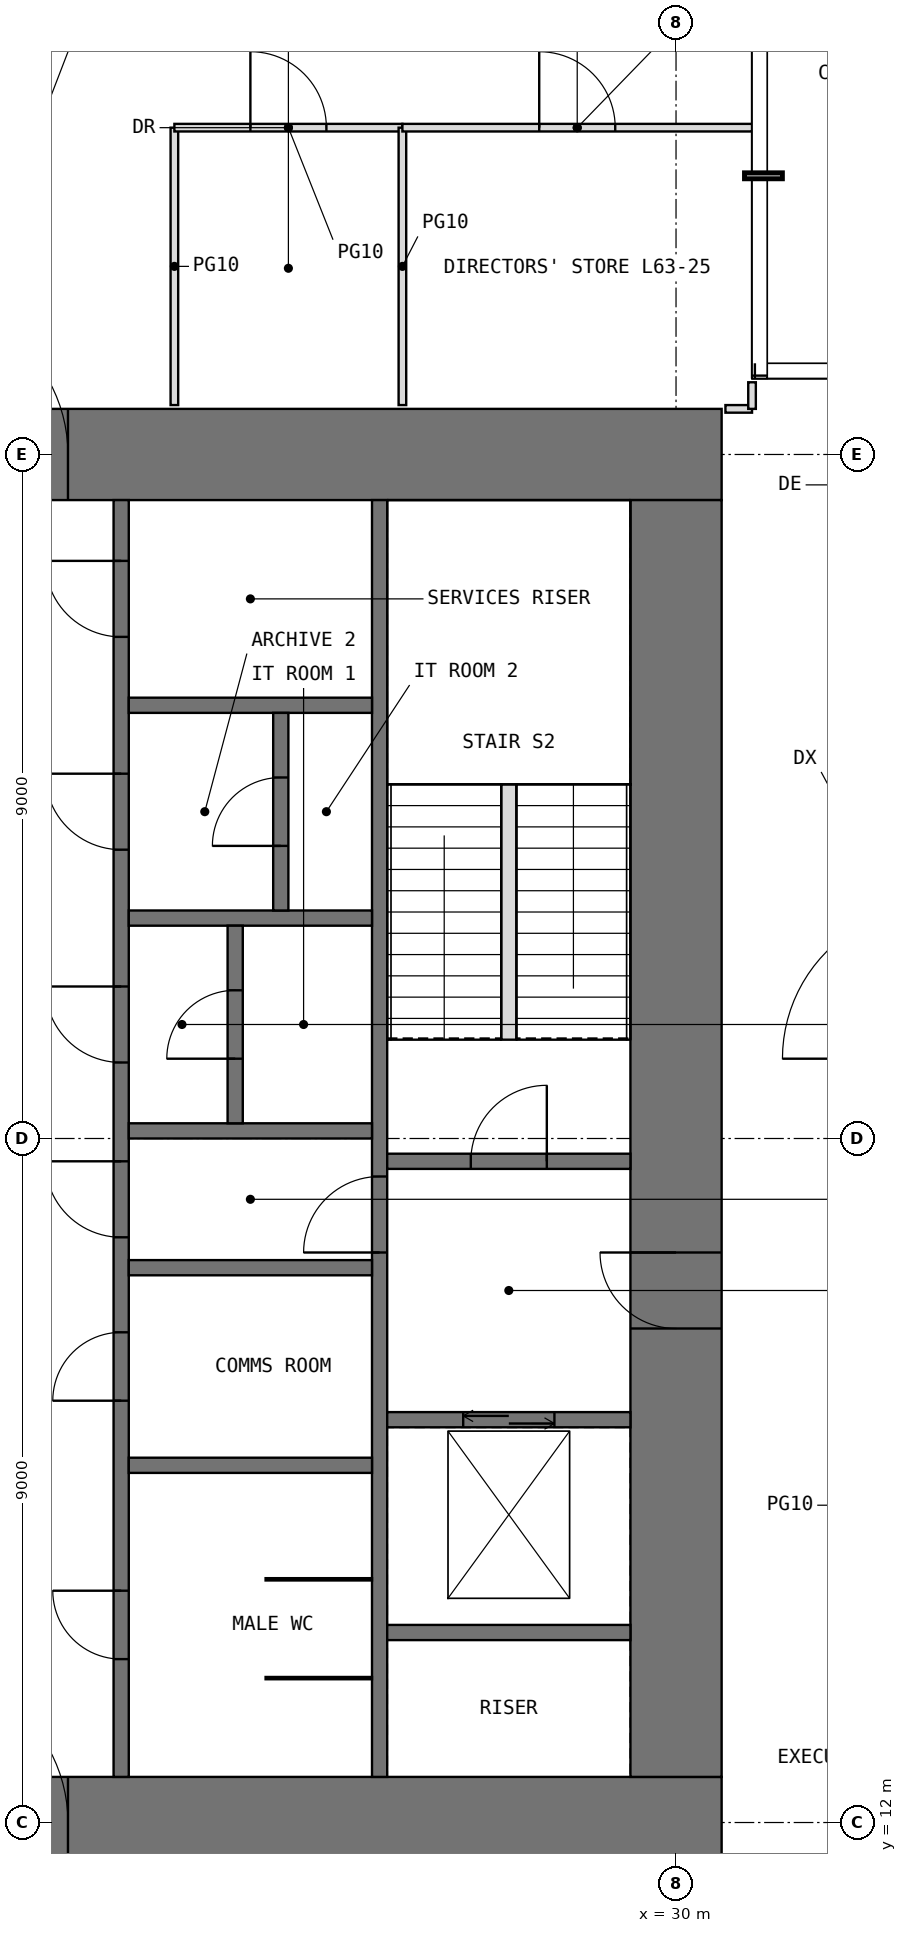
"""IFC4 building model, lengths in metres.
Left out: names, types, materials, properties, quantities, classifications, styles, units other than length and angle.
Written with IfcOpenShell. Run it as: python <this file> out.ifc"""

import sys

from ifc_helpers import new_model, si_unit, direction, frame, frame_2d, origin, place, context, subcontext, project, spatial, rectangle, extrude, element, fill, save


model = new_model("IFC4")
c1 = context("Model", 3, precision=1e-05, world=origin(), true_north=direction((0.0, 1.0)))
c2 = subcontext(c1, "Body", "Model", "MODEL_VIEW")
j1 = project(units=[si_unit("LENGTHUNIT", "METRE"), si_unit("PLANEANGLEUNIT", "RADIAN")], contexts=[c1])
p1 = place(None, origin())
s1 = spatial("IfcSite", under=j1, at=p1, CompositionType="ELEMENT")
p2 = place(p1, origin())
s2 = spatial("IfcBuilding", under=s1, at=p2, CompositionType="ELEMENT")
p3 = place(p2, frame((0.0, 0.0, 265.0)))
s3 = spatial("IfcBuildingStorey", under=s2, at=p3, CompositionType="ELEMENT", Elevation=265.0)
p4 = place(p3, frame((11.4, 12.0, -0.05), z_axis=(0.0, 0.0, 1.0), x_axis=(1.0, 0.0, 0.0)))
e1 = element("IfcWall", 1, at=p4, inside=s3, PredefinedType="SHEAR", context=c2, shape_type="SweptSolid", body=[
    extrude(rectangle(XDim=19.2, YDim=1.2, at=frame_2d((9.6, 0.0))), origin(), (0.0, 0.0, 1.0), 4.2),
])
p5 = place(p4, frame((8.6, 0.0, 0.05)))
e2 = element("IfcOpeningElement", 2, at=p5, cuts=e1, PredefinedType="OPENING", context=c2, shape_type="SweptSolid", body=[
    extrude(rectangle(XDim=2.0, YDim=2.2, at=frame_2d((1.0, 1.1))), frame((0.0, 0.61, 0.0), z_axis=(0.0, -1.0, 0.0), x_axis=(1.0, 0.0, 0.0)), (0.0, 0.0, 1.0), 1.22),
])
p6 = place(p3, frame((11.4, 30.0, -0.05), z_axis=(0.0, 0.0, 1.0), x_axis=(1.0, 0.0, 0.0)))
e3 = element("IfcWall", 3, at=p6, inside=s3, PredefinedType="SHEAR", context=c2, shape_type="SweptSolid", body=[
    extrude(rectangle(XDim=19.2, YDim=1.2, at=frame_2d((9.6, 0.0))), origin(), (0.0, 0.0, 1.0), 4.2),
])
p7 = place(p6, frame((8.6, 0.0, 0.05)))
e4 = element("IfcOpeningElement", 4, at=p7, cuts=e3, PredefinedType="OPENING", context=c2, shape_type="SweptSolid", body=[
    extrude(rectangle(XDim=2.0, YDim=2.2, at=frame_2d((1.0, 1.1))), frame((0.0, 0.61, 0.0), z_axis=(0.0, -1.0, 0.0), x_axis=(1.0, 0.0, 0.0)), (0.0, 0.0, 1.0), 1.22),
])
p8 = place(p3, frame((30.0, 12.6, -0.05), z_axis=(0.0, 0.0, 1.0), x_axis=(0.0, 1.0, 0.0)))
e5 = element("IfcWall", 5, at=p8, inside=s3, PredefinedType="SHEAR", context=c2, shape_type="SweptSolid", body=[
    extrude(rectangle(XDim=16.8, YDim=1.2, at=frame_2d((8.4, 0.0))), origin(), (0.0, 0.0, 1.0), 4.2),
])
p9 = place(p8, frame((5.9, 0.0, 0.05)))
e6 = element("IfcOpeningElement", 6, at=p9, cuts=e5, PredefinedType="OPENING", context=c2, shape_type="SweptSolid", body=[
    extrude(rectangle(XDim=1.0, YDim=2.2, at=frame_2d((0.5, 1.1))), frame((0.0, 0.61, 0.0), z_axis=(0.0, -1.0, 0.0), x_axis=(1.0, 0.0, 0.0)), (0.0, 0.0, 1.0), 1.22),
])
p10 = place(p3, frame((22.7, 12.6, -0.05), z_axis=(0.0, 0.0, 1.0), x_axis=(0.0, 1.0, 0.0)))
e7 = element("IfcWall", 7, at=p10, inside=s3, PredefinedType="SHEAR", context=c2, shape_type="SweptSolid", body=[
    extrude(rectangle(XDim=16.8, YDim=0.2, at=frame_2d((8.4, 0.0))), origin(), (0.0, 0.0, 1.0), 4.2),
])
p11 = place(p10, frame((7.1, 0.0, 0.05)))
e8 = element("IfcOpeningElement", 8, at=p11, cuts=e7, PredefinedType="OPENING", context=c2, shape_type="SweptSolid", body=[
    extrude(rectangle(XDim=1.0, YDim=2.2, at=frame_2d((0.5, 1.1))), frame((0.0, 0.11, 0.0), z_axis=(0.0, -1.0, 0.0), x_axis=(1.0, 0.0, 0.0)), (0.0, 0.0, 1.0), 0.22),
])
p12 = place(p10, frame((1.55, 0.0, 0.05)))
e9 = element("IfcOpeningElement", 9, at=p12, cuts=e7, PredefinedType="OPENING", context=c2, shape_type="SweptSolid", body=[
    extrude(rectangle(XDim=0.9, YDim=2.2, at=frame_2d((0.45, 1.1))), frame((0.0, 0.11, 0.0), z_axis=(0.0, -1.0, 0.0), x_axis=(1.0, 0.0, 0.0)), (0.0, 0.0, 1.0), 0.22),
])
p13 = place(p10, frame((4.95, 0.0, 0.05)))
e10 = element("IfcOpeningElement", 10, at=p13, cuts=e7, PredefinedType="OPENING", context=c2, shape_type="SweptSolid", body=[
    extrude(rectangle(XDim=0.9, YDim=2.2, at=frame_2d((0.45, 1.1))), frame((0.0, 0.11, 0.0), z_axis=(0.0, -1.0, 0.0), x_axis=(1.0, 0.0, 0.0)), (0.0, 0.0, 1.0), 0.22),
])
p14 = place(p10, frame((9.4, 0.0, 0.05)))
e11 = element("IfcOpeningElement", 11, at=p14, cuts=e7, PredefinedType="OPENING", context=c2, shape_type="SweptSolid", body=[
    extrude(rectangle(XDim=1.0, YDim=2.2, at=frame_2d((0.5, 1.1))), frame((0.0, 0.11, 0.0), z_axis=(0.0, -1.0, 0.0), x_axis=(1.0, 0.0, 0.0)), (0.0, 0.0, 1.0), 0.22),
])
p15 = place(p10, frame((12.2, 0.0, 0.05)))
e12 = element("IfcOpeningElement", 12, at=p15, cuts=e7, PredefinedType="OPENING", context=c2, shape_type="SweptSolid", body=[
    extrude(rectangle(XDim=1.0, YDim=2.2, at=frame_2d((0.5, 1.1))), frame((0.0, 0.11, 0.0), z_axis=(0.0, -1.0, 0.0), x_axis=(1.0, 0.0, 0.0)), (0.0, 0.0, 1.0), 0.22),
])
p16 = place(p10, frame((15.0, 0.0, 0.05)))
e13 = element("IfcOpeningElement", 13, at=p16, cuts=e7, PredefinedType="OPENING", context=c2, shape_type="SweptSolid", body=[
    extrude(rectangle(XDim=1.0, YDim=2.2, at=frame_2d((0.5, 1.1))), frame((0.0, 0.11, 0.0), z_axis=(0.0, -1.0, 0.0), x_axis=(1.0, 0.0, 0.0)), (0.0, 0.0, 1.0), 0.22),
])
p17 = place(p3, frame((26.1, 12.6, -0.05), z_axis=(0.0, 0.0, 1.0), x_axis=(0.0, 1.0, 0.0)))
e14 = element("IfcWall", 14, at=p17, inside=s3, PredefinedType="SHEAR", context=c2, shape_type="SweptSolid", body=[
    extrude(rectangle(XDim=16.8, YDim=0.2, at=frame_2d((8.4, 0.0))), origin(), (0.0, 0.0, 1.0), 4.2),
])
p18 = place(p17, frame((6.9, 0.0, 0.05)))
e15 = element("IfcOpeningElement", 15, at=p18, cuts=e14, PredefinedType="OPENING", context=c2, shape_type="SweptSolid", body=[
    extrude(rectangle(XDim=1.0, YDim=2.2, at=frame_2d((0.5, 1.1))), frame((0.0, 0.11, 0.0), z_axis=(0.0, -1.0, 0.0), x_axis=(1.0, 0.0, 0.0)), (0.0, 0.0, 1.0), 0.22),
])
for number, where, z_axis, x_axis in (
    (16, (22.8, 16.7, -0.05), (0.0, 0.0, 1.0), (1.0, 0.0, 0.0)),
    (17, (22.8, 19.3, -0.05), (0.0, 0.0, 1.0), (1.0, 0.0, 0.0)),
    (18, (22.8, 21.1, -0.05), (0.0, 0.0, 1.0), (1.0, 0.0, 0.0)),
    (19, (22.8, 23.9, -0.05), (0.0, 0.0, 1.0), (1.0, 0.0, 0.0)),
    (20, (22.8, 26.7, -0.05), (0.0, 0.0, 1.0), (1.0, 0.0, 0.0)),
    (21, (26.2, 14.5, -0.05), (0.0, 0.0, 1.0), (1.0, 0.0, 0.0)),
):
    element("IfcWall", number, at=place(p3, frame(where, z_axis=z_axis, x_axis=x_axis)), inside=s3, PredefinedType="SHEAR", context=c2, shape_type="SweptSolid", body=[
        extrude(rectangle(XDim=3.2, YDim=0.2, at=frame_2d((1.6, 0.0))), origin(), (0.0, 0.0, 1.0), 4.2),
    ])
p19 = place(p3, frame((26.2, 17.3, -0.05), z_axis=(0.0, 0.0, 1.0), x_axis=(1.0, 0.0, 0.0)))
e22 = element("IfcWall", 22, at=p19, inside=s3, PredefinedType="SHEAR", context=c2, shape_type="SweptSolid", body=[
    extrude(rectangle(XDim=3.2, YDim=0.2, at=frame_2d((1.6, 0.0))), origin(), (0.0, 0.0, 1.0), 4.2),
])
p20 = place(p19, frame((1.0, 0.0, 0.05)))
e23 = element("IfcOpeningElement", 23, at=p20, cuts=e22, PredefinedType="OPENING", context=c2, shape_type="SweptSolid", body=[
    extrude(rectangle(XDim=1.2, YDim=2.2, at=frame_2d((0.6, 1.1))), frame((0.0, 0.11, 0.0), z_axis=(0.0, -1.0, 0.0), x_axis=(1.0, 0.0, 0.0)), (0.0, 0.0, 1.0), 0.22),
])
p21 = place(p3, frame((26.2, 20.7, -0.05), z_axis=(0.0, 0.0, 1.0), x_axis=(1.0, 0.0, 0.0)))
e24 = element("IfcWall", 24, at=p21, inside=s3, PredefinedType="SHEAR", context=c2, shape_type="SweptSolid", body=[
    extrude(rectangle(XDim=3.2, YDim=0.2, at=frame_2d((1.6, 0.0))), origin(), (0.0, 0.0, 1.0), 4.2),
])
p22 = place(p21, frame((1.1, 0.0, 0.05)))
e25 = element("IfcOpeningElement", 25, at=p22, cuts=e24, PredefinedType="OPENING", context=c2, shape_type="SweptSolid", body=[
    extrude(rectangle(XDim=1.0, YDim=2.2, at=frame_2d((0.5, 1.1))), frame((0.0, 0.11, 0.0), z_axis=(0.0, -1.0, 0.0), x_axis=(1.0, 0.0, 0.0)), (0.0, 0.0, 1.0), 0.22),
])
for number, where, z_axis, x_axis in (
    (26, (24.6, 13.9, 0.0), (0.0, 0.0, 1.0), (1.0, 0.0, 0.0)),
    (27, (24.6, 15.2, 0.0), (0.0, 0.0, 1.0), (1.0, 0.0, 0.0)),
):
    element("IfcWall", number, at=place(p3, frame(where, z_axis=z_axis, x_axis=x_axis)), inside=s3, PredefinedType="PARTITIONING", context=c2, shape_type="SweptSolid", body=[
        extrude(rectangle(XDim=1.4, YDim=0.03, at=frame_2d((0.7, 0.0))), origin(), (0.0, 0.0, 1.0), 3.95),
    ])
p23 = place(p3, frame((24.2, 21.2, -0.05), z_axis=(0.0, 0.0, 1.0), x_axis=(0.0, 1.0, 0.0)))
e28 = element("IfcWall", 28, at=p23, inside=s3, PredefinedType="SHEAR", context=c2, shape_type="SweptSolid", body=[
    extrude(rectangle(XDim=2.6, YDim=0.2, at=frame_2d((1.3, 0.0))), origin(), (0.0, 0.0, 1.0), 4.2),
])
p24 = place(p23, frame((0.85, 0.0, 0.05)))
e29 = element("IfcOpeningElement", 29, at=p24, cuts=e28, PredefinedType="OPENING", context=c2, shape_type="SweptSolid", body=[
    extrude(rectangle(XDim=0.9, YDim=2.2, at=frame_2d((0.45, 1.1))), frame((0.0, 0.11, 0.0), z_axis=(0.0, -1.0, 0.0), x_axis=(1.0, 0.0, 0.0)), (0.0, 0.0, 1.0), 0.22),
])
p25 = place(p3, frame((24.8, 24.0, -0.05), z_axis=(0.0, 0.0, 1.0), x_axis=(0.0, 1.0, 0.0)))
e30 = element("IfcWall", 30, at=p25, inside=s3, PredefinedType="SHEAR", context=c2, shape_type="SweptSolid", body=[
    extrude(rectangle(XDim=2.6, YDim=0.2, at=frame_2d((1.3, 0.0))), origin(), (0.0, 0.0, 1.0), 4.2),
])
p26 = place(p25, frame((0.85, 0.0, 0.05)))
e31 = element("IfcOpeningElement", 31, at=p26, cuts=e30, PredefinedType="OPENING", context=c2, shape_type="SweptSolid", body=[
    extrude(rectangle(XDim=0.9, YDim=2.2, at=frame_2d((0.45, 1.1))), frame((0.0, 0.11, 0.0), z_axis=(0.0, -1.0, 0.0), x_axis=(1.0, 0.0, 0.0)), (0.0, 0.0, 1.0), 0.22),
])
p27 = place(p3, frame((23.4, 30.65, 0.0), z_axis=(0.0, 0.0, 1.0), x_axis=(0.0, 1.0, 0.0)))
e32 = element("IfcWall", 32, at=p27, inside=s3, PredefinedType="PARTITIONING", context=c2, shape_type="SweptSolid", body=[
    extrude(rectangle(XDim=3.65, YDim=0.1, at=frame_2d((1.825, 0.0))), origin(), (0.0, 0.0, 1.0), 3.95),
])
p28 = place(p3, frame((23.4, 34.3, 0.0), z_axis=(0.0, 0.0, 1.0), x_axis=(1.0, 0.0, 0.0)))
e33 = element("IfcWall", 33, at=p28, inside=s3, PredefinedType="PARTITIONING", context=c2, shape_type="SweptSolid", body=[
    extrude(rectangle(XDim=3.0, YDim=0.1, at=frame_2d((1.5, 0.0))), origin(), (0.0, 0.0, 1.0), 3.95),
])
p29 = place(p28, frame((1.0, 0.0, 0.0)))
e34 = element("IfcOpeningElement", 34, at=p29, cuts=e33, PredefinedType="OPENING", context=c2, shape_type="SweptSolid", body=[
    extrude(rectangle(XDim=1.0, YDim=2.2, at=frame_2d((0.5, 1.1))), frame((0.0, 0.06, 0.0), z_axis=(0.0, -1.0, 0.0), x_axis=(1.0, 0.0, 0.0)), (0.0, 0.0, 1.0), 0.12),
])
p30 = place(p3, frame((26.4, 30.65, 0.0), z_axis=(0.0, 0.0, 1.0), x_axis=(0.0, 1.0, 0.0)))
e35 = element("IfcWall", 35, at=p30, inside=s3, PredefinedType="PARTITIONING", context=c2, shape_type="SweptSolid", body=[
    extrude(rectangle(XDim=3.65, YDim=0.1, at=frame_2d((1.825, 0.0))), origin(), (0.0, 0.0, 1.0), 3.95),
])
p31 = place(p3, frame((26.4, 34.3, 0.0), z_axis=(0.0, 0.0, 1.0), x_axis=(1.0, 0.0, 0.0)))
e36 = element("IfcWall", 36, at=p31, inside=s3, PredefinedType="PARTITIONING", context=c2, shape_type="SweptSolid", body=[
    extrude(rectangle(XDim=4.6, YDim=0.1, at=frame_2d((2.3, 0.0))), origin(), (0.0, 0.0, 1.0), 3.95),
])
p32 = place(p31, frame((1.8, 0.0, 0.0)))
e37 = element("IfcOpeningElement", 37, at=p32, cuts=e36, PredefinedType="OPENING", context=c2, shape_type="SweptSolid", body=[
    extrude(rectangle(XDim=1.0, YDim=2.2, at=frame_2d((0.5, 1.1))), frame((0.0, 0.06, 0.0), z_axis=(0.0, -1.0, 0.0), x_axis=(1.0, 0.0, 0.0)), (0.0, 0.0, 1.0), 0.12),
])
p33 = place(p3, frame((30.65, 30.6, 0.0), z_axis=(0.0, 0.0, 1.0), x_axis=(1.0, 0.0, 0.0)))
e38 = element("IfcWall", 38, at=p33, inside=s3, PredefinedType="PARTITIONING", context=c2, shape_type="SweptSolid", body=[
    extrude(rectangle(XDim=0.35, YDim=0.1, at=frame_2d((0.175, 0.0))), origin(), (0.0, 0.0, 1.0), 3.95),
])
p34 = place(p3, frame((31.0, 30.6, 0.0), z_axis=(0.0, 0.0, 1.0), x_axis=(0.0, 1.0, 0.0)))
e39 = element("IfcWall", 39, at=p34, inside=s3, PredefinedType="PARTITIONING", context=c2, shape_type="SweptSolid", body=[
    extrude(rectangle(XDim=0.35, YDim=0.1, at=frame_2d((0.175, 0.0))), origin(), (0.0, 0.0, 1.0), 3.95),
])
p35 = place(p3, frame((27.8, 22.3, 0.0), z_axis=(0.0, 0.0, 1.0), x_axis=(0.0, 1.0, 0.0)))
e40 = element("IfcWall", 40, at=p35, inside=s3, PredefinedType="PARTITIONING", context=c2, shape_type="SweptSolid", body=[
    extrude(rectangle(XDim=3.36, YDim=0.2, at=frame_2d((1.68, 0.0))), origin(), (0.0, 0.0, 1.0), 4.2),
])
p36 = place(p5, origin())
e41 = element("IfcDoor", 41, at=p36, inside=s3, OperationType="DOUBLE_DOOR_SINGLE_SWING", PredefinedType="DOOR", context=c2, shape_type="SweptSolid", body=[
    extrude(rectangle(XDim=2.0, YDim=2.2, at=frame_2d((1.0, 1.1))), frame((0.0, 0.025, 0.0), z_axis=(0.0, -1.0, 0.0), x_axis=(1.0, 0.0, 0.0)), (0.0, 0.0, 1.0), 0.05),
])
fill(e2, e41)
p37 = place(p7, origin())
e42 = element("IfcDoor", 42, at=p37, inside=s3, OperationType="DOUBLE_DOOR_SINGLE_SWING", PredefinedType="DOOR", context=c2, shape_type="SweptSolid", body=[
    extrude(rectangle(XDim=2.0, YDim=2.2, at=frame_2d((1.0, 1.1))), frame((0.0, 0.025, 0.0), z_axis=(0.0, -1.0, 0.0), x_axis=(1.0, 0.0, 0.0)), (0.0, 0.0, 1.0), 0.05),
])
fill(e4, e42)
p38 = place(p9, origin())
e43 = element("IfcDoor", 43, at=p38, inside=s3, OperationType="SINGLE_SWING_RIGHT", PredefinedType="DOOR", context=c2, shape_type="SweptSolid", body=[
    extrude(rectangle(XDim=1.0, YDim=2.2, at=frame_2d((0.5, 1.1))), frame((0.0, 0.025, 0.0), z_axis=(0.0, -1.0, 0.0), x_axis=(1.0, 0.0, 0.0)), (0.0, 0.0, 1.0), 0.05),
])
fill(e6, e43)
p39 = place(p22, origin())
e44 = element("IfcDoor", 44, at=p39, inside=s3, OperationType="SINGLE_SWING_RIGHT", PredefinedType="DOOR", context=c2, shape_type="SweptSolid", body=[
    extrude(rectangle(XDim=1.0, YDim=2.2, at=frame_2d((0.5, 1.1))), frame((0.0, 0.025, 0.0), z_axis=(0.0, -1.0, 0.0), x_axis=(1.0, 0.0, 0.0)), (0.0, 0.0, 1.0), 0.05),
])
fill(e25, e44)
p40 = place(p18, origin())
e45 = element("IfcDoor", 45, at=p40, inside=s3, OperationType="SINGLE_SWING_LEFT", PredefinedType="DOOR", context=c2, shape_type="SweptSolid", body=[
    extrude(rectangle(XDim=1.0, YDim=2.2, at=frame_2d((0.5, 1.1))), frame((0.0, 0.025, 0.0), z_axis=(0.0, -1.0, 0.0), x_axis=(1.0, 0.0, 0.0)), (0.0, 0.0, 1.0), 0.05),
])
fill(e15, e45)
p41 = place(p11, origin())
e46 = element("IfcDoor", 46, at=p41, inside=s3, OperationType="SINGLE_SWING_RIGHT", PredefinedType="DOOR", context=c2, shape_type="SweptSolid", body=[
    extrude(rectangle(XDim=1.0, YDim=2.2, at=frame_2d((0.5, 1.1))), frame((0.0, 0.025, 0.0), z_axis=(0.0, -1.0, 0.0), x_axis=(1.0, 0.0, 0.0)), (0.0, 0.0, 1.0), 0.05),
])
fill(e8, e46)
p42 = place(p12, origin())
e47 = element("IfcDoor", 47, at=p42, inside=s3, OperationType="SINGLE_SWING_RIGHT", PredefinedType="DOOR", context=c2, shape_type="SweptSolid", body=[
    extrude(rectangle(XDim=0.9, YDim=2.2, at=frame_2d((0.45, 1.1))), frame((0.0, 0.025, 0.0), z_axis=(0.0, -1.0, 0.0), x_axis=(1.0, 0.0, 0.0)), (0.0, 0.0, 1.0), 0.05),
])
fill(e9, e47)
p43 = place(p13, origin())
e48 = element("IfcDoor", 48, at=p43, inside=s3, OperationType="SINGLE_SWING_LEFT", PredefinedType="DOOR", context=c2, shape_type="SweptSolid", body=[
    extrude(rectangle(XDim=0.9, YDim=2.2, at=frame_2d((0.45, 1.1))), frame((0.0, 0.025, 0.0), z_axis=(0.0, -1.0, 0.0), x_axis=(1.0, 0.0, 0.0)), (0.0, 0.0, 1.0), 0.05),
])
fill(e10, e48)
p44 = place(p14, origin())
e49 = element("IfcDoor", 49, at=p44, inside=s3, OperationType="SINGLE_SWING_RIGHT", PredefinedType="DOOR", context=c2, shape_type="SweptSolid", body=[
    extrude(rectangle(XDim=1.0, YDim=2.2, at=frame_2d((0.5, 1.1))), frame((0.0, 0.025, 0.0), z_axis=(0.0, -1.0, 0.0), x_axis=(1.0, 0.0, 0.0)), (0.0, 0.0, 1.0), 0.05),
])
fill(e11, e49)
p45 = place(p24, origin())
e50 = element("IfcDoor", 50, at=p45, inside=s3, OperationType="SINGLE_SWING_LEFT", PredefinedType="DOOR", context=c2, shape_type="SweptSolid", body=[
    extrude(rectangle(XDim=0.9, YDim=2.2, at=frame_2d((0.45, 1.1))), frame((0.0, 0.025, 0.0), z_axis=(0.0, -1.0, 0.0), x_axis=(1.0, 0.0, 0.0)), (0.0, 0.0, 1.0), 0.05),
])
fill(e29, e50)
p46 = place(p15, origin())
e51 = element("IfcDoor", 51, at=p46, inside=s3, OperationType="SINGLE_SWING_RIGHT", PredefinedType="DOOR", context=c2, shape_type="SweptSolid", body=[
    extrude(rectangle(XDim=1.0, YDim=2.2, at=frame_2d((0.5, 1.1))), frame((0.0, 0.025, 0.0), z_axis=(0.0, -1.0, 0.0), x_axis=(1.0, 0.0, 0.0)), (0.0, 0.0, 1.0), 0.05),
])
fill(e12, e51)
p47 = place(p26, origin())
e52 = element("IfcDoor", 52, at=p47, inside=s3, OperationType="SINGLE_SWING_LEFT", PredefinedType="DOOR", context=c2, shape_type="SweptSolid", body=[
    extrude(rectangle(XDim=0.9, YDim=2.2, at=frame_2d((0.45, 1.1))), frame((0.0, 0.025, 0.0), z_axis=(0.0, -1.0, 0.0), x_axis=(1.0, 0.0, 0.0)), (0.0, 0.0, 1.0), 0.05),
])
fill(e31, e52)
p48 = place(p16, origin())
e53 = element("IfcDoor", 53, at=p48, inside=s3, OperationType="SINGLE_SWING_RIGHT", PredefinedType="DOOR", context=c2, shape_type="SweptSolid", body=[
    extrude(rectangle(XDim=1.0, YDim=2.2, at=frame_2d((0.5, 1.1))), frame((0.0, 0.025, 0.0), z_axis=(0.0, -1.0, 0.0), x_axis=(1.0, 0.0, 0.0)), (0.0, 0.0, 1.0), 0.05),
])
fill(e13, e53)
p49 = place(p29, origin())
e54 = element("IfcDoor", 54, at=p49, inside=s3, OperationType="SINGLE_SWING_LEFT", PredefinedType="DOOR", context=c2, shape_type="SweptSolid", body=[
    extrude(rectangle(XDim=1.0, YDim=2.2, at=frame_2d((0.5, 1.1))), frame((0.0, 0.025, 0.0), z_axis=(0.0, -1.0, 0.0), x_axis=(1.0, 0.0, 0.0)), (0.0, 0.0, 1.0), 0.05),
])
fill(e34, e54)
p50 = place(p32, origin())
e55 = element("IfcDoor", 55, at=p50, inside=s3, OperationType="SINGLE_SWING_LEFT", PredefinedType="DOOR", context=c2, shape_type="SweptSolid", body=[
    extrude(rectangle(XDim=1.0, YDim=2.2, at=frame_2d((0.5, 1.1))), frame((0.0, 0.025, 0.0), z_axis=(0.0, -1.0, 0.0), x_axis=(1.0, 0.0, 0.0)), (0.0, 0.0, 1.0), 0.05),
])
fill(e37, e55)
p51 = place(p20, origin())
e56 = element("IfcDoor", 56, at=p51, inside=s3, OperationType="DOUBLE_DOOR_SLIDING", PredefinedType="DOOR", context=c2, shape_type="SweptSolid", body=[
    extrude(rectangle(XDim=1.2, YDim=2.2, at=frame_2d((0.6, 1.1))), frame((0.0, 0.025, 0.0), z_axis=(0.0, -1.0, 0.0), x_axis=(1.0, 0.0, 0.0)), (0.0, 0.0, 1.0), 0.05),
])
fill(e23, e56)
save(model, sys.argv[1])
